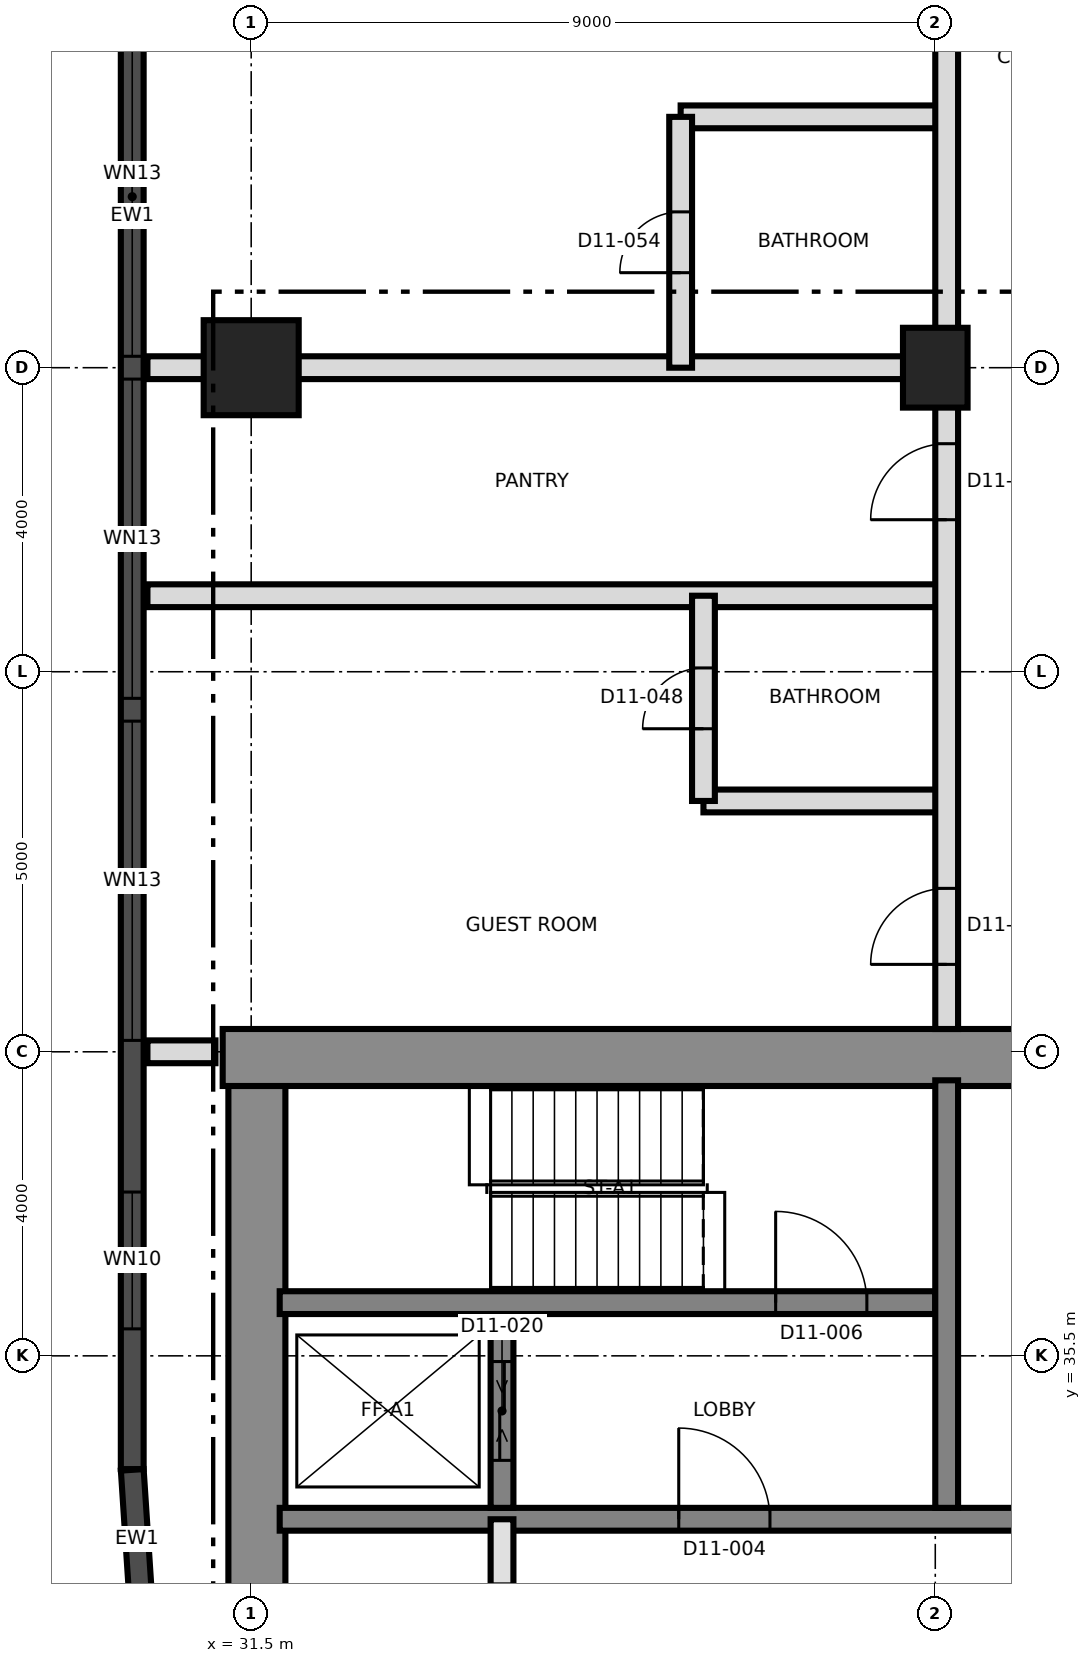
"""IFC4 building model, lengths in metres.
Left out: names, types, materials, properties, quantities, classifications, styles, units other than length and angle.
Written with IfcOpenShell. Run it as: python <this file> out.ifc"""

import sys

from ifc_helpers import new_model, si_unit, direction, frame, frame_2d, origin, origin_2d, place, context, subcontext, project, spatial, rectangle, extrude, element, fill, save


model = new_model("IFC4")
c1 = context("Model", 3, precision=1e-05, world=origin(), true_north=direction((0.0, 1.0)))
c2 = subcontext(c1, "Body", "Model", "MODEL_VIEW")
j1 = project(units=[si_unit("LENGTHUNIT", "METRE"), si_unit("PLANEANGLEUNIT", "RADIAN")], contexts=[c1])
p1 = place(None, origin())
s1 = spatial("IfcSite", under=j1, at=p1, CompositionType="ELEMENT")
p2 = place(p1, origin())
s2 = spatial("IfcBuilding", under=s1, at=p2, CompositionType="ELEMENT")
p3 = place(p2, frame((0.0, 0.0, 124.1)))
s3 = spatial("IfcBuildingStorey", under=s2, at=p3, CompositionType="ELEMENT", Elevation=124.1)
p4 = place(p3, frame((31.575, 21.875, 0.0), z_axis=(0.0, 0.0, 1.0), x_axis=(0.0, 1.0, 0.0)))
e1 = element("IfcWall", 1, at=p4, inside=s3, PredefinedType="SHEAR", context=c2, shape_type="SweptSolid", body=[
    extrude(rectangle(XDim=17.25, YDim=0.75, at=frame_2d((8.625, 0.0))), origin(), (0.0, 0.0, 1.0), 3.7),
])
p5 = place(p3, frame((31.125, 39.425, 0.0), z_axis=(0.0, 0.0, 1.0), x_axis=(1.0, 0.0, 0.0)))
e2 = element("IfcWall", 2, at=p5, inside=s3, PredefinedType="SHEAR", context=c2, shape_type="SweptSolid", body=[
    extrude(rectangle(XDim=27.0, YDim=0.75, at=frame_2d((13.5, 0.0))), origin(), (0.0, 0.0, 1.0), 3.7),
])
p6 = place(p5, frame((10.575, 0.0, 0.0)))
e3 = element("IfcOpeningElement", 3, at=p6, cuts=e2, PredefinedType="OPENING", context=c2, shape_type="SweptSolid", body=[
    extrude(rectangle(XDim=1.2, YDim=2.1, at=frame_2d((0.6, 1.05))), frame((0.0, 0.385, 0.0), z_axis=(0.0, -1.0, 0.0), x_axis=(1.0, 0.0, 0.0)), (0.0, 0.0, 1.0), 0.77),
])
p7 = place(p3, frame((31.875, 33.35, 0.0), z_axis=(0.0, 0.0, 1.0), x_axis=(1.0, 0.0, 0.0)))
e4 = element("IfcWall", 4, at=p7, inside=s3, PredefinedType="SHEAR", context=c2, shape_type="SweptSolid", body=[
    extrude(rectangle(XDim=26.25, YDim=0.3, at=frame_2d((13.125, 0.0))), origin(), (0.0, 0.0, 1.0), 3.7),
])
p8 = place(p7, frame((13.2, 0.0, 0.0)))
e5 = element("IfcOpeningElement", 5, at=p8, cuts=e4, PredefinedType="OPENING", context=c2, shape_type="SweptSolid", body=[
    extrude(rectangle(XDim=1.4, YDim=2.1, at=frame_2d((0.7, 1.05))), frame((0.0, 0.16, 0.0), z_axis=(0.0, -1.0, 0.0), x_axis=(1.0, 0.0, 0.0)), (0.0, 0.0, 1.0), 0.32),
])
p9 = place(p7, frame((5.25, 0.0, 0.0)))
e6 = element("IfcOpeningElement", 6, at=p9, cuts=e4, PredefinedType="OPENING", context=c2, shape_type="SweptSolid", body=[
    extrude(rectangle(XDim=1.2, YDim=2.1, at=frame_2d((0.6, 1.05))), frame((0.0, 0.16, 0.0), z_axis=(0.0, -1.0, 0.0), x_axis=(1.0, 0.0, 0.0)), (0.0, 0.0, 1.0), 0.32),
])
p10 = place(p7, frame((19.8, 0.0, 0.0)))
e7 = element("IfcOpeningElement", 7, at=p10, cuts=e4, PredefinedType="OPENING", context=c2, shape_type="SweptSolid", body=[
    extrude(rectangle(XDim=1.2, YDim=2.1, at=frame_2d((0.6, 1.05))), frame((0.0, 0.16, 0.0), z_axis=(0.0, -1.0, 0.0), x_axis=(1.0, 0.0, 0.0)), (0.0, 0.0, 1.0), 0.32),
])
p11 = place(p3, frame((31.875, 36.2, 0.0), z_axis=(0.0, 0.0, 1.0), x_axis=(1.0, 0.0, 0.0)))
e8 = element("IfcWall", 8, at=p11, inside=s3, PredefinedType="SHEAR", context=c2, shape_type="SweptSolid", body=[
    extrude(rectangle(XDim=8.625, YDim=0.3, at=frame_2d((4.312, 0.0))), origin(), (0.0, 0.0, 1.0), 3.7),
])
p12 = place(p11, frame((6.525, 0.0, 0.0)))
e9 = element("IfcOpeningElement", 9, at=p12, cuts=e8, PredefinedType="OPENING", context=c2, shape_type="SweptSolid", body=[
    extrude(rectangle(XDim=1.2, YDim=2.1, at=frame_2d((0.6, 1.05))), frame((0.0, 0.16, 0.0), z_axis=(0.0, -1.0, 0.0), x_axis=(1.0, 0.0, 0.0)), (0.0, 0.0, 1.0), 0.32),
])
p13 = place(p3, frame((40.65, 33.5, 0.0), z_axis=(0.0, 0.0, 1.0), x_axis=(0.0, 1.0, 0.0)))
e10 = element("IfcWall", 10, at=p13, inside=s3, PredefinedType="SHEAR", context=c2, shape_type="SweptSolid", body=[
    extrude(rectangle(XDim=5.625, YDim=0.3, at=frame_2d((2.812, 0.0))), origin(), (0.0, 0.0, 1.0), 3.7),
])
p14 = place(p3, frame((34.8, 33.5, 0.0), z_axis=(0.0, 0.0, 1.0), x_axis=(0.0, 1.0, 0.0)))
e11 = element("IfcWall", 11, at=p14, inside=s3, PredefinedType="SHEAR", context=c2, shape_type="SweptSolid", body=[
    extrude(rectangle(XDim=2.55, YDim=0.3, at=frame_2d((1.275, 0.0))), origin(), (0.0, 0.0, 1.0), 3.7),
])
p15 = place(p14, frame((0.625, 0.0, 0.0)))
e12 = element("IfcOpeningElement", 12, at=p15, cuts=e11, PredefinedType="OPENING", context=c2, shape_type="SweptSolid", body=[
    extrude(rectangle(XDim=1.3, YDim=2.4, at=frame_2d((0.65, 1.2))), frame((0.0, 0.16, 0.0), z_axis=(0.0, -1.0, 0.0), x_axis=(1.0, 0.0, 0.0)), (0.0, 0.0, 1.0), 0.32),
])
p16 = place(p3, frame((31.5, 48.5, 0.0), z_axis=(0.0, 0.0, 1.0), x_axis=(1.0, 0.0, 0.0)))
e13 = element("IfcColumn", 13, at=p16, inside=s3, PredefinedType="COLUMN", context=c2, shape_type="SweptSolid", body=[
    extrude(rectangle(XDim=1.25, YDim=1.25, at=origin_2d()), origin(), (0.0, 0.0, 1.0), 3.7),
])
p17 = place(p3, frame((40.5, 48.5, 0.0), z_axis=(0.0, 0.0, 1.0), x_axis=(0.0, 1.0, 0.0)))
e14 = element("IfcColumn", 14, at=p17, inside=s3, PredefinedType="COLUMN", context=c2, shape_type="SweptSolid", body=[
    extrude(rectangle(XDim=1.05, YDim=0.85, at=origin_2d()), origin(), (0.0, 0.0, 1.0), 3.7),
])
p18 = place(p3, frame((29.935, 66.986, 0.0), z_axis=(0.0, 0.0, 1.0), x_axis=(0.0, -1.0, 0.0)))
e15 = element("IfcWall", 15, at=p18, inside=s3, PredefinedType="SOLIDWALL", context=c2, shape_type="SweptSolid", body=[
    extrude(rectangle(XDim=32.976, YDim=0.3, at=frame_2d((16.488, 0.0))), origin(), (0.0, 0.0, 1.0), 3.4),
])
p19 = place(p18, frame((1.593, 0.0, 0.3)))
e16 = element("IfcOpeningElement", 16, at=p19, cuts=e15, PredefinedType="OPENING", context=c2, shape_type="SweptSolid", body=[
    extrude(rectangle(XDim=1.8, YDim=2.4, at=frame_2d((0.9, 1.2))), frame((0.0, 0.16, 0.0), z_axis=(0.0, -1.0, 0.0), x_axis=(1.0, 0.0, 0.0)), (0.0, 0.0, 1.0), 0.32),
])
p20 = place(p18, frame((5.136, 0.0, 0.9)))
e17 = element("IfcOpeningElement", 17, at=p20, cuts=e15, PredefinedType="OPENING", context=c2, shape_type="SweptSolid", body=[
    extrude(rectangle(XDim=4.2, YDim=1.7, at=frame_2d((2.1, 0.85))), frame((0.0, 0.16, 0.0), z_axis=(0.0, -1.0, 0.0), x_axis=(1.0, 0.0, 0.0)), (0.0, 0.0, 1.0), 0.32),
])
p21 = place(p18, frame((9.636, 0.0, 0.9)))
e18 = element("IfcOpeningElement", 18, at=p21, cuts=e15, PredefinedType="OPENING", context=c2, shape_type="SweptSolid", body=[
    extrude(rectangle(XDim=4.2, YDim=1.7, at=frame_2d((2.1, 0.85))), frame((0.0, 0.16, 0.0), z_axis=(0.0, -1.0, 0.0), x_axis=(1.0, 0.0, 0.0)), (0.0, 0.0, 1.0), 0.32),
])
p22 = place(p18, frame((14.136, 0.0, 0.9)))
e19 = element("IfcOpeningElement", 19, at=p22, cuts=e15, PredefinedType="OPENING", context=c2, shape_type="SweptSolid", body=[
    extrude(rectangle(XDim=4.2, YDim=1.7, at=frame_2d((2.1, 0.85))), frame((0.0, 0.16, 0.0), z_axis=(0.0, -1.0, 0.0), x_axis=(1.0, 0.0, 0.0)), (0.0, 0.0, 1.0), 0.32),
])
p23 = place(p18, frame((18.636, 0.0, 0.9)))
e20 = element("IfcOpeningElement", 20, at=p23, cuts=e15, PredefinedType="OPENING", context=c2, shape_type="SweptSolid", body=[
    extrude(rectangle(XDim=4.2, YDim=1.7, at=frame_2d((2.1, 0.85))), frame((0.0, 0.16, 0.0), z_axis=(0.0, -1.0, 0.0), x_axis=(1.0, 0.0, 0.0)), (0.0, 0.0, 1.0), 0.32),
])
p24 = place(p18, frame((23.136, 0.0, 0.9)))
e21 = element("IfcOpeningElement", 21, at=p24, cuts=e15, PredefinedType="OPENING", context=c2, shape_type="SweptSolid", body=[
    extrude(rectangle(XDim=4.2, YDim=1.7, at=frame_2d((2.1, 0.85))), frame((0.0, 0.16, 0.0), z_axis=(0.0, -1.0, 0.0), x_axis=(1.0, 0.0, 0.0)), (0.0, 0.0, 1.0), 0.32),
])
p25 = place(p18, frame((29.331, 0.0, 0.3)))
e22 = element("IfcOpeningElement", 22, at=p25, cuts=e15, PredefinedType="OPENING", context=c2, shape_type="SweptSolid", body=[
    extrude(rectangle(XDim=1.8, YDim=2.4, at=frame_2d((0.9, 1.2))), frame((0.0, 0.16, 0.0), z_axis=(0.0, -1.0, 0.0), x_axis=(1.0, 0.0, 0.0)), (0.0, 0.0, 1.0), 0.32),
])
p26 = place(p3, frame((29.935, 34.0, 0.0), z_axis=(0.0, 0.0, 1.0), x_axis=(0.065376617685, -0.997860660543, 0.0)))
e23 = element("IfcWall", 23, at=p26, inside=s3, PredefinedType="SOLIDWALL", context=c2, shape_type="SweptSolid", body=[
    extrude(rectangle(XDim=1.83, YDim=0.3, at=frame_2d((0.915, 0.0))), origin(), (0.0, 0.0, 1.0), 3.4),
])
p27 = place(p3, frame((34.8, 27.9, 0.0), z_axis=(0.0, 0.0, 1.0), x_axis=(0.0, 1.0, 0.0)))
e24 = element("IfcWall", 24, at=p27, inside=s3, PredefinedType="SOLIDWALL", context=c2, shape_type="SweptSolid", body=[
    extrude(rectangle(XDim=5.45, YDim=0.3, at=frame_2d((2.725, 0.0))), origin(), (0.0, 0.0, 1.0), 3.4),
])
p28 = place(p27, frame((3.6, 0.0, 0.0)))
e25 = element("IfcOpeningElement", 25, at=p28, cuts=e24, PredefinedType="OPENING", context=c2, shape_type="SweptSolid", body=[
    extrude(rectangle(XDim=1.0, YDim=2.1, at=frame_2d((0.5, 1.05))), frame((0.0, 0.16, 0.0), z_axis=(0.0, -1.0, 0.0), x_axis=(1.0, 0.0, 0.0)), (0.0, 0.0, 1.0), 0.32),
])
p29 = place(p3, frame((30.135, 39.5, 0.0), z_axis=(0.0, 0.0, 1.0), x_axis=(1.0, 0.0, 0.0)))
e26 = element("IfcWall", 26, at=p29, inside=s3, PredefinedType="PARTITIONING", context=c2, shape_type="SweptSolid", body=[
    extrude(rectangle(XDim=0.895, YDim=0.3, at=frame_2d((0.448, 0.0))), origin(), (0.0, 0.0, 1.0), 3.4),
])
p30 = place(p3, frame((37.45, 42.8, 0.0), z_axis=(0.0, 0.0, 1.0), x_axis=(1.0, 0.0, 0.0)))
e27 = element("IfcWall", 27, at=p30, inside=s3, PredefinedType="PARTITIONING", context=c2, shape_type="SweptSolid", body=[
    extrude(rectangle(XDim=3.2, YDim=0.3, at=frame_2d((1.6, 0.0))), origin(), (0.0, 0.0, 1.0), 3.4),
])
for number, where, z_axis, x_axis in (
    (28, (30.135, 45.5, 0.0), (0.0, 0.0, 1.0), (1.0, 0.0, 0.0)),
    (29, (30.135, 48.5, 0.0), (0.0, 0.0, 1.0), (1.0, 0.0, 0.0)),
):
    element("IfcWall", number, at=place(p3, frame(where, z_axis=z_axis, x_axis=x_axis)), inside=s3, PredefinedType="PARTITIONING", context=c2, shape_type="SweptSolid", body=[
        extrude(rectangle(XDim=10.515, YDim=0.3, at=frame_2d((5.257, 0.0))), origin(), (0.0, 0.0, 1.0), 3.4),
    ])
p31 = place(p3, frame((37.15, 51.8, 0.0), z_axis=(0.0, 0.0, 1.0), x_axis=(1.0, 0.0, 0.0)))
e30 = element("IfcWall", 30, at=p31, inside=s3, PredefinedType="PARTITIONING", context=c2, shape_type="SweptSolid", body=[
    extrude(rectangle(XDim=3.5, YDim=0.3, at=frame_2d((1.75, 0.0))), origin(), (0.0, 0.0, 1.0), 3.4),
])
p32 = place(p3, frame((37.15, 48.5, 0.0), z_axis=(0.0, 0.0, 1.0), x_axis=(0.0, 1.0, 0.0)))
e31 = element("IfcWall", 31, at=p32, inside=s3, PredefinedType="PARTITIONING", context=c2, shape_type="SweptSolid", body=[
    extrude(rectangle(XDim=3.3, YDim=0.3, at=frame_2d((1.65, 0.0))), origin(), (0.0, 0.0, 1.0), 3.4),
])
p33 = place(p32, frame((1.25, 0.0, 0.0)))
e32 = element("IfcOpeningElement", 32, at=p33, cuts=e31, PredefinedType="OPENING", context=c2, shape_type="SweptSolid", body=[
    extrude(rectangle(XDim=0.8, YDim=2.1, at=frame_2d((0.4, 1.05))), frame((0.0, 0.16, 0.0), z_axis=(0.0, -1.0, 0.0), x_axis=(1.0, 0.0, 0.0)), (0.0, 0.0, 1.0), 0.32),
])
p34 = place(p3, frame((37.45, 42.8, 0.0), z_axis=(0.0, 0.0, 1.0), x_axis=(0.0, 1.0, 0.0)))
e33 = element("IfcWall", 33, at=p34, inside=s3, PredefinedType="PARTITIONING", context=c2, shape_type="SweptSolid", body=[
    extrude(rectangle(XDim=2.7, YDim=0.3, at=frame_2d((1.35, 0.0))), origin(), (0.0, 0.0, 1.0), 3.4),
])
p35 = place(p34, frame((0.95, 0.0, 0.0)))
e34 = element("IfcOpeningElement", 34, at=p35, cuts=e33, PredefinedType="OPENING", context=c2, shape_type="SweptSolid", body=[
    extrude(rectangle(XDim=0.8, YDim=2.1, at=frame_2d((0.4, 1.05))), frame((0.0, 0.16, 0.0), z_axis=(0.0, -1.0, 0.0), x_axis=(1.0, 0.0, 0.0)), (0.0, 0.0, 1.0), 0.32),
])
p36 = place(p3, frame((40.65, 39.8, 0.0), z_axis=(0.0, 0.0, 1.0), x_axis=(0.0, 1.0, 0.0)))
e35 = element("IfcWall", 35, at=p36, inside=s3, PredefinedType="PARTITIONING", context=c2, shape_type="SweptSolid", body=[
    extrude(rectangle(XDim=37.305, YDim=0.3, at=frame_2d((18.652, 0.0))), origin(), (0.0, 0.0, 1.0), 3.4),
])
p37 = place(p36, frame((0.85, 0.0, 0.0)))
e36 = element("IfcOpeningElement", 36, at=p37, cuts=e35, PredefinedType="OPENING", context=c2, shape_type="SweptSolid", body=[
    extrude(rectangle(XDim=1.0, YDim=2.1, at=frame_2d((0.5, 1.05))), frame((0.0, 0.16, 0.0), z_axis=(0.0, -1.0, 0.0), x_axis=(1.0, 0.0, 0.0)), (0.0, 0.0, 1.0), 0.32),
])
p38 = place(p36, frame((6.7, 0.0, 0.0)))
e37 = element("IfcOpeningElement", 37, at=p38, cuts=e35, PredefinedType="OPENING", context=c2, shape_type="SweptSolid", body=[
    extrude(rectangle(XDim=1.0, YDim=2.1, at=frame_2d((0.5, 1.05))), frame((0.0, 0.16, 0.0), z_axis=(0.0, -1.0, 0.0), x_axis=(1.0, 0.0, 0.0)), (0.0, 0.0, 1.0), 0.32),
])
p39 = place(p36, frame((14.35, 0.0, 0.0)))
e38 = element("IfcOpeningElement", 38, at=p39, cuts=e35, PredefinedType="OPENING", context=c2, shape_type="SweptSolid", body=[
    extrude(rectangle(XDim=1.0, YDim=2.4, at=frame_2d((0.5, 1.2))), frame((0.0, 0.16, 0.0), z_axis=(0.0, -1.0, 0.0), x_axis=(1.0, 0.0, 0.0)), (0.0, 0.0, 1.0), 0.32),
])
p40 = place(p36, frame((21.2, 0.0, 0.0)))
e39 = element("IfcOpeningElement", 39, at=p40, cuts=e35, PredefinedType="OPENING", context=c2, shape_type="SweptSolid", body=[
    extrude(rectangle(XDim=1.0, YDim=2.4, at=frame_2d((0.5, 1.2))), frame((0.0, 0.16, 0.0), z_axis=(0.0, -1.0, 0.0), x_axis=(1.0, 0.0, 0.0)), (0.0, 0.0, 1.0), 0.32),
])
p41 = place(p22, origin())
e40 = element("IfcWindow", 40, at=p41, inside=s3, PartitioningType="SINGLE_PANEL", PredefinedType="WINDOW", context=c2, shape_type="SweptSolid", body=[
    extrude(rectangle(XDim=4.2, YDim=1.7, at=frame_2d((2.1, 0.85))), frame((0.0, 0.03, 0.0), z_axis=(0.0, -1.0, 0.0), x_axis=(1.0, 0.0, 0.0)), (0.0, 0.0, 1.0), 0.06),
])
fill(e19, e40)
p42 = place(p23, origin())
e41 = element("IfcWindow", 41, at=p42, inside=s3, PartitioningType="SINGLE_PANEL", PredefinedType="WINDOW", context=c2, shape_type="SweptSolid", body=[
    extrude(rectangle(XDim=4.2, YDim=1.7, at=frame_2d((2.1, 0.85))), frame((0.0, 0.03, 0.0), z_axis=(0.0, -1.0, 0.0), x_axis=(1.0, 0.0, 0.0)), (0.0, 0.0, 1.0), 0.06),
])
fill(e20, e41)
p43 = place(p24, origin())
e42 = element("IfcWindow", 42, at=p43, inside=s3, PartitioningType="SINGLE_PANEL", PredefinedType="WINDOW", context=c2, shape_type="SweptSolid", body=[
    extrude(rectangle(XDim=4.2, YDim=1.7, at=frame_2d((2.1, 0.85))), frame((0.0, 0.03, 0.0), z_axis=(0.0, -1.0, 0.0), x_axis=(1.0, 0.0, 0.0)), (0.0, 0.0, 1.0), 0.06),
])
fill(e21, e42)
p44 = place(p25, origin())
e43 = element("IfcWindow", 43, at=p44, inside=s3, PartitioningType="SINGLE_PANEL", PredefinedType="WINDOW", context=c2, shape_type="SweptSolid", body=[
    extrude(rectangle(XDim=1.8, YDim=2.4, at=frame_2d((0.9, 1.2))), frame((0.0, 0.03, 0.0), z_axis=(0.0, -1.0, 0.0), x_axis=(1.0, 0.0, 0.0)), (0.0, 0.0, 1.0), 0.06),
])
fill(e22, e43)
p45 = place(p9, origin())
e44 = element("IfcDoor", 44, at=p45, inside=s3, OperationType="SINGLE_SWING_LEFT", PredefinedType="DOOR", context=c2, shape_type="SweptSolid", body=[
    extrude(rectangle(XDim=1.2, YDim=2.1, at=frame_2d((0.6, 1.05))), frame((0.0, 0.025, 0.0), z_axis=(0.0, -1.0, 0.0), x_axis=(1.0, 0.0, 0.0)), (0.0, 0.0, 1.0), 0.05),
])
fill(e6, e44)
p46 = place(p12, origin())
e45 = element("IfcDoor", 45, at=p46, inside=s3, OperationType="SINGLE_SWING_RIGHT", PredefinedType="DOOR", context=c2, shape_type="SweptSolid", body=[
    extrude(rectangle(XDim=1.2, YDim=2.1, at=frame_2d((0.6, 1.05))), frame((0.0, 0.025, 0.0), z_axis=(0.0, -1.0, 0.0), x_axis=(1.0, 0.0, 0.0)), (0.0, 0.0, 1.0), 0.05),
])
fill(e9, e45)
p47 = place(p15, origin())
e46 = element("IfcDoor", 46, at=p47, inside=s3, OperationType="SLIDING_TO_LEFT", PredefinedType="DOOR", context=c2, shape_type="SweptSolid", body=[
    extrude(rectangle(XDim=1.3, YDim=2.4, at=frame_2d((0.65, 1.2))), frame((0.0, 0.025, 0.0), z_axis=(0.0, -1.0, 0.0), x_axis=(1.0, 0.0, 0.0)), (0.0, 0.0, 1.0), 0.05),
])
fill(e12, e46)
p48 = place(p35, origin())
e47 = element("IfcDoor", 47, at=p48, inside=s3, OperationType="SINGLE_SWING_LEFT", PredefinedType="DOOR", context=c2, shape_type="SweptSolid", body=[
    extrude(rectangle(XDim=0.8, YDim=2.1, at=frame_2d((0.4, 1.05))), frame((0.0, 0.025, 0.0), z_axis=(0.0, -1.0, 0.0), x_axis=(1.0, 0.0, 0.0)), (0.0, 0.0, 1.0), 0.05),
])
fill(e34, e47)
p49 = place(p37, origin())
e48 = element("IfcDoor", 48, at=p49, inside=s3, OperationType="SINGLE_SWING_LEFT", PredefinedType="DOOR", context=c2, shape_type="SweptSolid", body=[
    extrude(rectangle(XDim=1.0, YDim=2.1, at=frame_2d((0.5, 1.05))), frame((0.0, 0.025, 0.0), z_axis=(0.0, -1.0, 0.0), x_axis=(1.0, 0.0, 0.0)), (0.0, 0.0, 1.0), 0.05),
])
fill(e36, e48)
p50 = place(p38, origin())
e49 = element("IfcDoor", 49, at=p50, inside=s3, OperationType="SINGLE_SWING_RIGHT", PredefinedType="DOOR", context=c2, shape_type="SweptSolid", body=[
    extrude(rectangle(XDim=1.0, YDim=2.1, at=frame_2d((0.5, 1.05))), frame((0.0, 0.025, 0.0), z_axis=(0.0, -1.0, 0.0), x_axis=(1.0, 0.0, 0.0)), (0.0, 0.0, 1.0), 0.05),
])
fill(e37, e49)
p51 = place(p33, origin())
e50 = element("IfcDoor", 50, at=p51, inside=s3, OperationType="SINGLE_SWING_LEFT", PredefinedType="DOOR", context=c2, shape_type="SweptSolid", body=[
    extrude(rectangle(XDim=0.8, YDim=2.1, at=frame_2d((0.4, 1.05))), frame((0.0, 0.025, 0.0), z_axis=(0.0, -1.0, 0.0), x_axis=(1.0, 0.0, 0.0)), (0.0, 0.0, 1.0), 0.05),
])
fill(e32, e50)
save(model, sys.argv[1])
